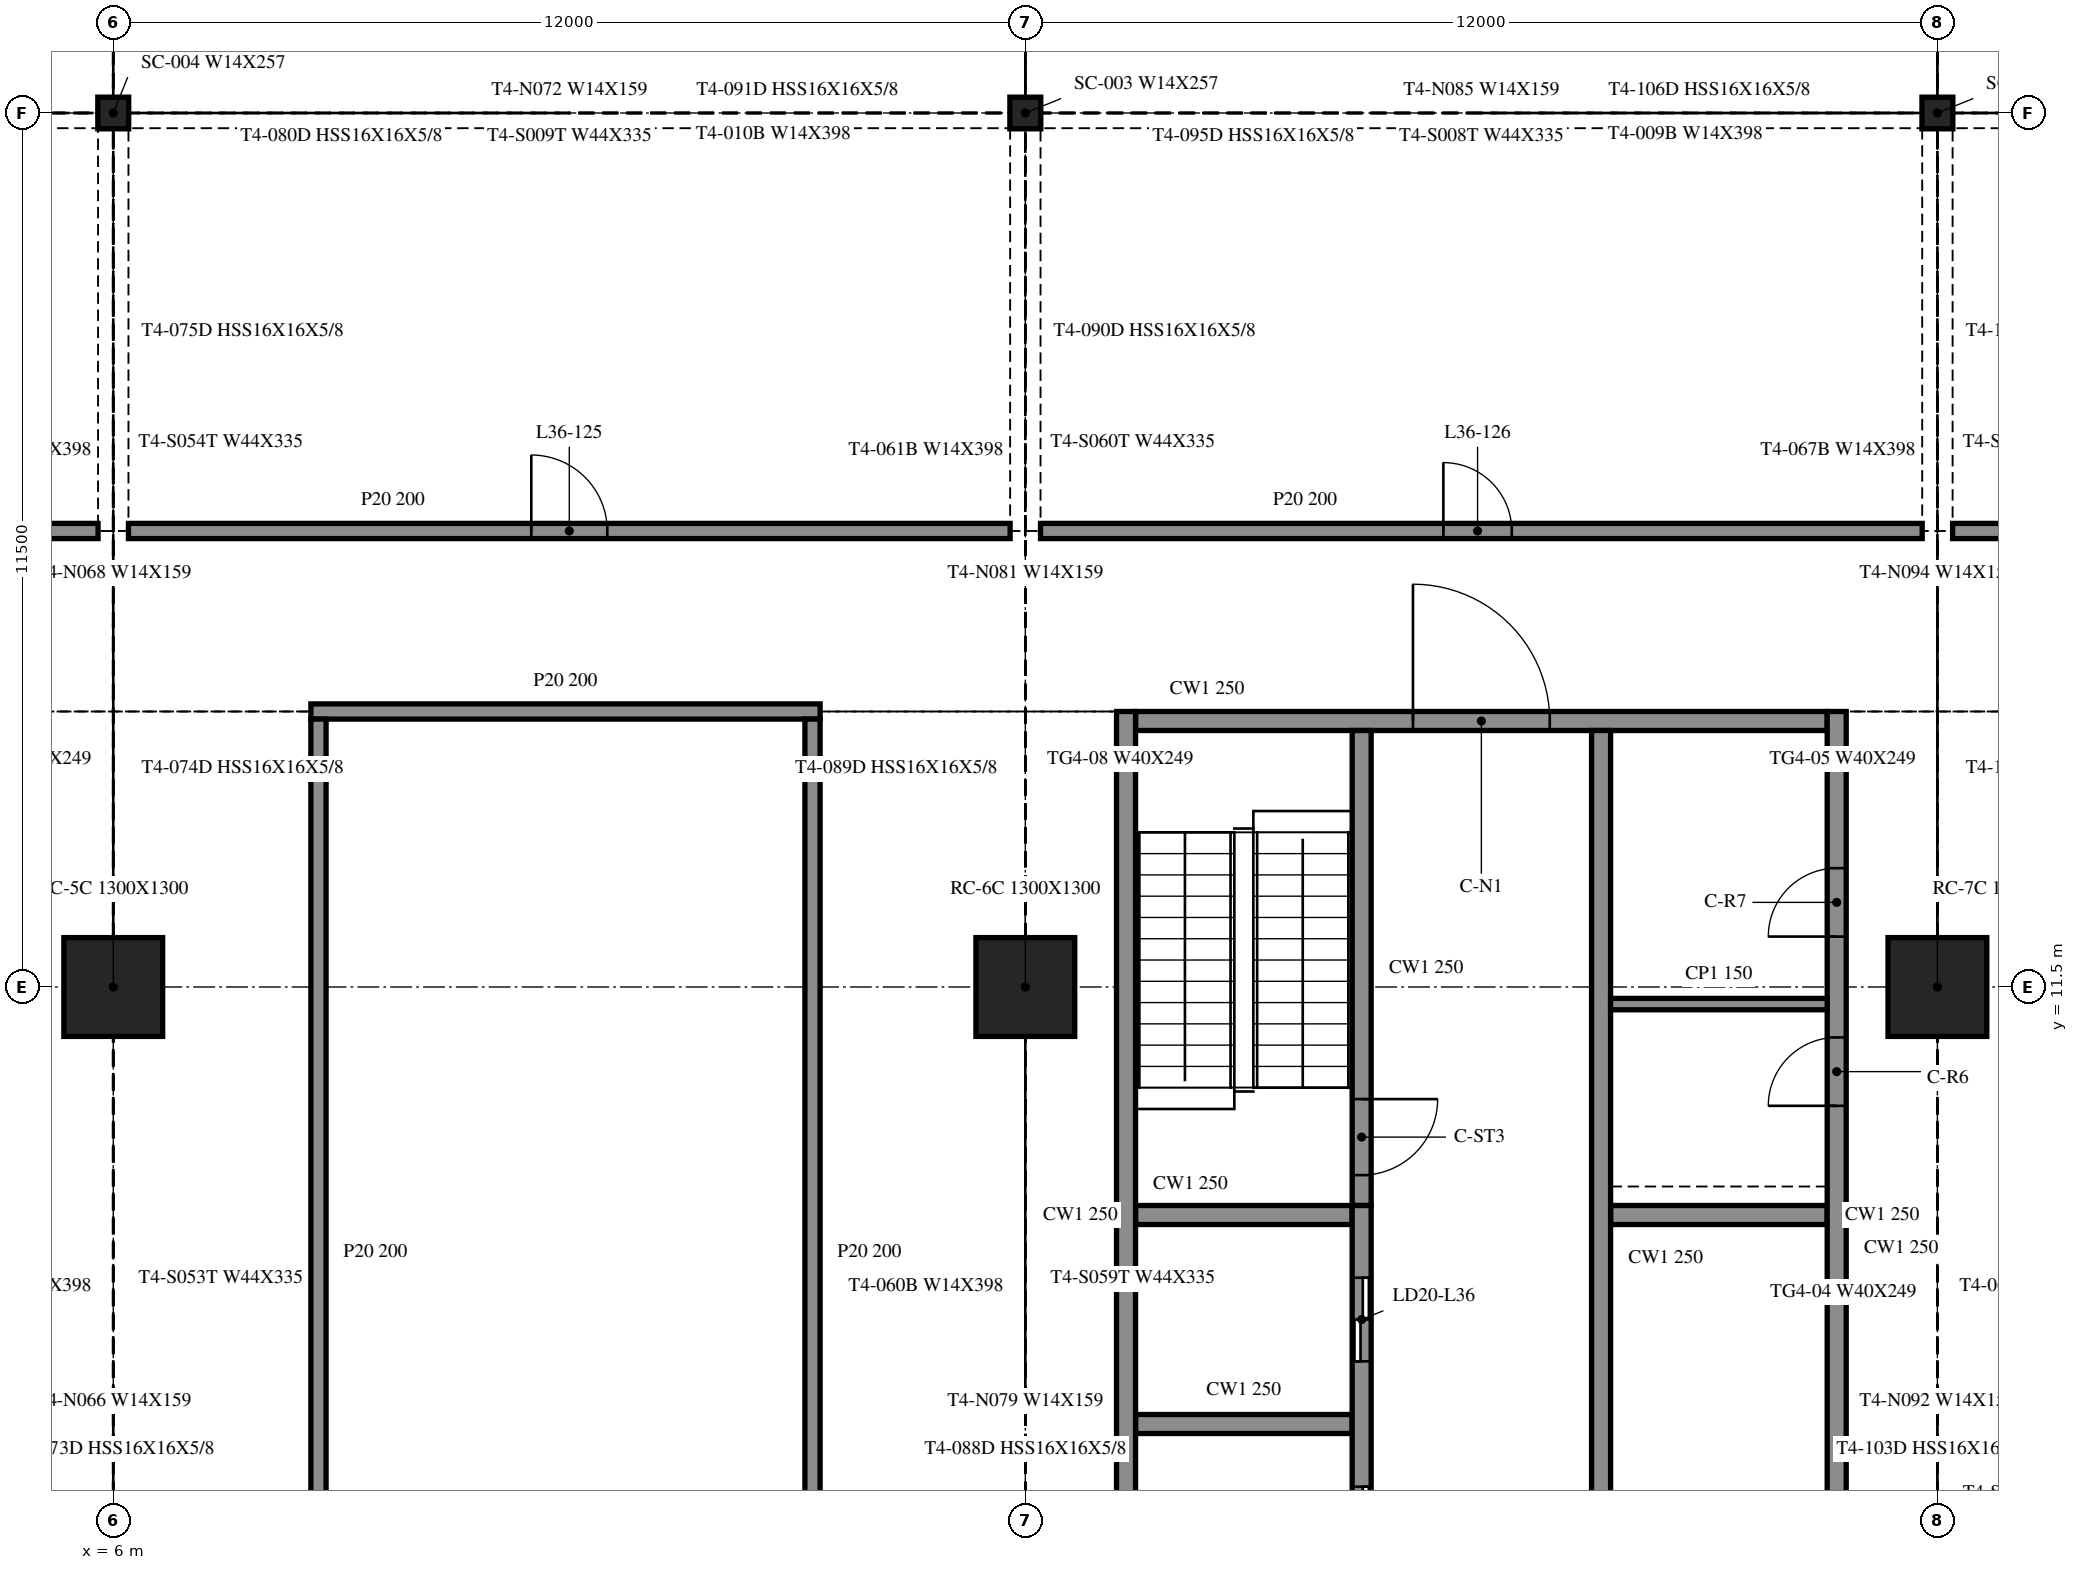
"""IFC4 building model, lengths in metres.
Left out: names, types, materials, properties, quantities, classifications, styles, units other than length and angle.
Written with IfcOpenShell. Run it as: python <this file> out.ifc"""

import sys

from ifc_helpers import new_model, si_unit, direction, frame, frame_2d, origin, origin_2d, place, context, subcontext, project, spatial, rectangle, i_section, extrude, element, fill, save


model = new_model("IFC4")
c1 = context("Model", 3, precision=1e-05, world=origin(), true_north=direction((0.0, 1.0)))
c2 = subcontext(c1, "Body", "Model", "MODEL_VIEW")
j1 = project(units=[si_unit("LENGTHUNIT", "METRE"), si_unit("PLANEANGLEUNIT", "RADIAN")], contexts=[c1])
p1 = place(None, origin())
s1 = spatial("IfcSite", under=j1, at=p1, CompositionType="ELEMENT")
p2 = place(p1, origin())
s2 = spatial("IfcBuilding", under=s1, at=p2, CompositionType="ELEMENT")
p3 = place(p2, frame((0.0, 0.0, 154.8)))
s3 = spatial("IfcBuildingStorey", under=s2, at=p3, CompositionType="ELEMENT", Elevation=154.8)
for number, where, z_axis, x_axis in (
    (1, (6.0, 11.5, -0.55), (0.0, 0.0, 1.0), (1.0, 0.0, 0.0)),
    (2, (18.0, 11.5, -0.55), (0.0, 0.0, 1.0), (1.0, 0.0, 0.0)),
    (3, (30.0, 11.5, -0.55), (0.0, 0.0, 1.0), (1.0, 0.0, 0.0)),
):
    element("IfcColumn", number, at=place(p3, frame(where, z_axis=z_axis, x_axis=x_axis)), inside=s3, PredefinedType="COLUMN", context=c2, shape_type="SweptSolid", body=[
        extrude(rectangle(XDim=1.3, YDim=1.3, at=origin_2d()), origin(), (0.0, 0.0, 1.0), 4.61),
    ])
for number, where, z_axis, x_axis in (
    (4, (30.0, 23.0, -0.55), (0.0, 0.0, 1.0), (1.0, 0.0, 0.0)),
    (5, (18.0, 23.0, -0.55), (0.0, 0.0, 1.0), (1.0, 0.0, 0.0)),
    (6, (6.0, 23.0, -0.55), (0.0, 0.0, 1.0), (1.0, 0.0, 0.0)),
):
    element("IfcColumn", number, at=place(p3, frame(where, z_axis=z_axis, x_axis=x_axis)), inside=s3, PredefinedType="COLUMN", context=c2, shape_type="SweptSolid", body=[
        extrude(i_section(OverallWidth=0.406, OverallDepth=0.417, WebThickness=0.03, FlangeThickness=0.048, at=origin_2d()), origin(), (0.0, 0.0, 1.0), 4.61),
    ])
p4 = place(p3, frame((19.325, 15.125, 0.0), z_axis=(0.0, 0.0, 1.0), x_axis=(0.0, -1.0, 0.0)))
e7 = element("IfcWall", 7, at=p4, inside=s3, PredefinedType="SOLIDWALL", context=c2, shape_type="SweptSolid", body=[
    extrude(rectangle(XDim=24.25, YDim=0.25, at=frame_2d((12.125, 0.0))), origin(), (0.0, 0.0, 1.0), 4.06),
])
p5 = place(p3, frame((28.675, -9.125, 0.0), z_axis=(0.0, 0.0, 1.0), x_axis=(0.0, 1.0, 0.0)))
e8 = element("IfcWall", 8, at=p5, inside=s3, PredefinedType="SOLIDWALL", context=c2, shape_type="SweptSolid", body=[
    extrude(rectangle(XDim=24.25, YDim=0.25, at=frame_2d((12.125, 0.0))), origin(), (0.0, 0.0, 1.0), 4.06),
])
p6 = place(p5, frame((19.062, 0.0, 0.0)))
e9 = element("IfcOpeningElement", 9, at=p6, cuts=e8, PredefinedType="OPENING", context=c2, shape_type="SweptSolid", body=[
    extrude(rectangle(XDim=0.9, YDim=2.1, at=frame_2d((0.45, 1.05))), frame((0.0, 0.135, 0.0), z_axis=(0.0, -1.0, 0.0), x_axis=(1.0, 0.0, 0.0)), (0.0, 0.0, 1.0), 0.27),
])
p7 = place(p5, frame((21.289, 0.0, 0.0)))
e10 = element("IfcOpeningElement", 10, at=p7, cuts=e8, PredefinedType="OPENING", context=c2, shape_type="SweptSolid", body=[
    extrude(rectangle(XDim=0.9, YDim=2.1, at=frame_2d((0.45, 1.05))), frame((0.0, 0.135, 0.0), z_axis=(0.0, -1.0, 0.0), x_axis=(1.0, 0.0, 0.0)), (0.0, 0.0, 1.0), 0.27),
])
p8 = place(p3, frame((19.45, 15.0, 0.0), z_axis=(0.0, 0.0, 1.0), x_axis=(1.0, 0.0, 0.0)))
e11 = element("IfcWall", 11, at=p8, inside=s3, PredefinedType="SOLIDWALL", context=c2, shape_type="SweptSolid", body=[
    extrude(rectangle(XDim=9.1, YDim=0.25, at=frame_2d((4.55, 0.0))), origin(), (0.0, 0.0, 1.0), 4.06),
])
p9 = place(p8, frame((3.65, 0.0, 0.0)))
e12 = element("IfcOpeningElement", 12, at=p9, cuts=e11, PredefinedType="OPENING", context=c2, shape_type="SweptSolid", body=[
    extrude(rectangle(XDim=1.8, YDim=2.1, at=frame_2d((0.9, 1.05))), frame((0.0, 0.135, 0.0), z_axis=(0.0, -1.0, 0.0), x_axis=(1.0, 0.0, 0.0)), (0.0, 0.0, 1.0), 0.27),
])
p10 = place(p3, frame((22.425, -8.875, 0.0), z_axis=(0.0, 0.0, 1.0), x_axis=(0.0, 1.0, 0.0)))
e13 = element("IfcWall", 13, at=p10, inside=s3, PredefinedType="SOLIDWALL", context=c2, shape_type="SweptSolid", body=[
    extrude(rectangle(XDim=17.5, YDim=0.25, at=frame_2d((8.75, 0.0))), origin(), (0.0, 0.0, 1.0), 4.06),
])
p11 = place(p10, frame((7.2, 0.0, 0.0)))
e14 = element("IfcOpeningElement", 14, at=p11, cuts=e13, PredefinedType="OPENING", context=c2, shape_type="SweptSolid", body=[
    extrude(rectangle(XDim=1.1, YDim=2.1, at=frame_2d((0.55, 1.05))), frame((0.0, 0.135, 0.0), z_axis=(0.0, -1.0, 0.0), x_axis=(1.0, 0.0, 0.0)), (0.0, 0.0, 1.0), 0.27),
])
p12 = place(p10, frame((9.95, 0.0, 0.0)))
e15 = element("IfcOpeningElement", 15, at=p12, cuts=e13, PredefinedType="OPENING", context=c2, shape_type="SweptSolid", body=[
    extrude(rectangle(XDim=1.1, YDim=2.1, at=frame_2d((0.55, 1.05))), frame((0.0, 0.135, 0.0), z_axis=(0.0, -1.0, 0.0), x_axis=(1.0, 0.0, 0.0)), (0.0, 0.0, 1.0), 0.27),
])
p13 = place(p10, frame((12.7, 0.0, 0.0)))
e16 = element("IfcOpeningElement", 16, at=p13, cuts=e13, PredefinedType="OPENING", context=c2, shape_type="SweptSolid", body=[
    extrude(rectangle(XDim=1.1, YDim=2.1, at=frame_2d((0.55, 1.05))), frame((0.0, 0.135, 0.0), z_axis=(0.0, -1.0, 0.0), x_axis=(1.0, 0.0, 0.0)), (0.0, 0.0, 1.0), 0.27),
])
p14 = place(p10, frame((15.45, 0.0, 0.0)))
e17 = element("IfcOpeningElement", 17, at=p14, cuts=e13, PredefinedType="OPENING", context=c2, shape_type="SweptSolid", body=[
    extrude(rectangle(XDim=1.1, YDim=2.1, at=frame_2d((0.55, 1.05))), frame((0.0, 0.135, 0.0), z_axis=(0.0, -1.0, 0.0), x_axis=(1.0, 0.0, 0.0)), (0.0, 0.0, 1.0), 0.27),
])
p15 = place(p10, frame((0.512, 0.0, 0.0)))
e18 = element("IfcOpeningElement", 18, at=p15, cuts=e13, PredefinedType="OPENING", context=c2, shape_type="SweptSolid", body=[
    extrude(rectangle(XDim=0.9, YDim=2.1, at=frame_2d((0.45, 1.05))), frame((0.0, 0.135, 0.0), z_axis=(0.0, -1.0, 0.0), x_axis=(1.0, 0.0, 0.0)), (0.0, 0.0, 1.0), 0.27),
])
p16 = place(p10, frame((2.55, 0.0, 0.0)))
e19 = element("IfcOpeningElement", 19, at=p16, cuts=e13, PredefinedType="OPENING", context=c2, shape_type="SweptSolid", body=[
    extrude(rectangle(XDim=0.9, YDim=2.1, at=frame_2d((0.45, 1.05))), frame((0.0, 0.135, 0.0), z_axis=(0.0, -1.0, 0.0), x_axis=(1.0, 0.0, 0.0)), (0.0, 0.0, 1.0), 0.27),
])
p17 = place(p10, frame((4.587, 0.0, 0.0)))
e20 = element("IfcOpeningElement", 20, at=p17, cuts=e13, PredefinedType="OPENING", context=c2, shape_type="SweptSolid", body=[
    extrude(rectangle(XDim=0.9, YDim=2.1, at=frame_2d((0.45, 1.05))), frame((0.0, 0.135, 0.0), z_axis=(0.0, -1.0, 0.0), x_axis=(1.0, 0.0, 0.0)), (0.0, 0.0, 1.0), 0.27),
])
p18 = place(p3, frame((22.425, 14.875, 0.0), z_axis=(0.0, 0.0, 1.0), x_axis=(0.0, -1.0, 0.0)))
e21 = element("IfcWall", 21, at=p18, inside=s3, PredefinedType="SOLIDWALL", context=c2, shape_type="SweptSolid", body=[
    extrude(rectangle(XDim=6.25, YDim=0.25, at=frame_2d((3.125, 0.0))), origin(), (0.0, 0.0, 1.0), 4.06),
])
p19 = place(p18, frame((4.85, 0.0, 0.0)))
e22 = element("IfcOpeningElement", 22, at=p19, cuts=e21, PredefinedType="OPENING", context=c2, shape_type="SweptSolid", body=[
    extrude(rectangle(XDim=1.0, YDim=2.1, at=frame_2d((0.5, 1.05))), frame((0.0, 0.135, 0.0), z_axis=(0.0, -1.0, 0.0), x_axis=(1.0, 0.0, 0.0)), (0.0, 0.0, 1.0), 0.27),
])
p20 = place(p3, frame((25.575, 14.875, 0.0), z_axis=(0.0, 0.0, 1.0), x_axis=(0.0, -1.0, 0.0)))
e23 = element("IfcWall", 23, at=p20, inside=s3, PredefinedType="SOLIDWALL", context=c2, shape_type="SweptSolid", body=[
    extrude(rectangle(XDim=17.5, YDim=0.25, at=frame_2d((8.75, 0.0))), origin(), (0.0, 0.0, 1.0), 4.06),
])
p21 = place(p20, frame((15.45, 0.0, 0.0)))
e24 = element("IfcOpeningElement", 24, at=p21, cuts=e23, PredefinedType="OPENING", context=c2, shape_type="SweptSolid", body=[
    extrude(rectangle(XDim=1.1, YDim=2.1, at=frame_2d((0.55, 1.05))), frame((0.0, 0.135, 0.0), z_axis=(0.0, -1.0, 0.0), x_axis=(1.0, 0.0, 0.0)), (0.0, 0.0, 1.0), 0.27),
])
p22 = place(p20, frame((12.8, 0.0, 0.0)))
e25 = element("IfcOpeningElement", 25, at=p22, cuts=e23, PredefinedType="OPENING", context=c2, shape_type="SweptSolid", body=[
    extrude(rectangle(XDim=0.9, YDim=2.1, at=frame_2d((0.45, 1.05))), frame((0.0, 0.135, 0.0), z_axis=(0.0, -1.0, 0.0), x_axis=(1.0, 0.0, 0.0)), (0.0, 0.0, 1.0), 0.27),
])
for number, where, z_axis, x_axis in (
    (26, (19.45, 5.75, 0.0), (0.0, 0.0, 1.0), (1.0, 0.0, 0.0)),
    (27, (19.45, 8.5, 0.0), (0.0, 0.0, 1.0), (1.0, 0.0, 0.0)),
    (28, (25.7, 8.5, 0.0), (0.0, 0.0, 1.0), (1.0, 0.0, 0.0)),
):
    element("IfcWall", number, at=place(p3, frame(where, z_axis=z_axis, x_axis=x_axis)), inside=s3, PredefinedType="SOLIDWALL", context=c2, shape_type="SweptSolid", body=[
        extrude(rectangle(XDim=2.85, YDim=0.25, at=frame_2d((1.425, 0.0))), origin(), (0.0, 0.0, 1.0), 4.06),
    ])
p23 = place(p3, frame((25.7, 11.275, 0.0), z_axis=(0.0, 0.0, 1.0), x_axis=(1.0, 0.0, 0.0)))
e29 = element("IfcWall", 29, at=p23, inside=s3, PredefinedType="PARTITIONING", context=c2, shape_type="SweptSolid", body=[
    extrude(rectangle(XDim=2.85, YDim=0.15, at=frame_2d((1.425, 0.0))), origin(), (0.0, 0.0, 1.0), 4.06),
])
p24 = place(p3, frame((8.6, 15.125, 0.0), z_axis=(0.0, 0.0, 1.0), x_axis=(1.0, 0.0, 0.0)))
e30 = element("IfcWall", 30, at=p24, inside=s3, PredefinedType="PARTITIONING", context=c2, shape_type="SweptSolid", body=[
    extrude(rectangle(XDim=6.7, YDim=0.2, at=frame_2d((3.35, 0.0))), origin(), (0.0, 0.0, 1.0), 4.06),
])
p25 = place(p3, frame((-5.8, 17.5, 0.0), z_axis=(0.0, 0.0, 1.0), x_axis=(1.0, 0.0, 0.0)))
e31 = element("IfcWall", 31, at=p25, inside=s3, PredefinedType="PARTITIONING", context=c2, shape_type="SweptSolid", body=[
    extrude(rectangle(XDim=11.6, YDim=0.2, at=frame_2d((5.8, 0.0))), origin(), (0.0, 0.0, 1.0), 4.06),
])
p26 = place(p25, frame((5.3, 0.0, 0.0)))
e32 = element("IfcOpeningElement", 32, at=p26, cuts=e31, PredefinedType="OPENING", context=c2, shape_type="SweptSolid", body=[
    extrude(rectangle(XDim=1.0, YDim=2.1, at=frame_2d((0.5, 1.05))), frame((0.0, 0.11, 0.0), z_axis=(0.0, -1.0, 0.0), x_axis=(1.0, 0.0, 0.0)), (0.0, 0.0, 1.0), 0.22),
])
p27 = place(p3, frame((6.2, 17.5, 0.0), z_axis=(0.0, 0.0, 1.0), x_axis=(1.0, 0.0, 0.0)))
e33 = element("IfcWall", 33, at=p27, inside=s3, PredefinedType="PARTITIONING", context=c2, shape_type="SweptSolid", body=[
    extrude(rectangle(XDim=11.6, YDim=0.2, at=frame_2d((5.8, 0.0))), origin(), (0.0, 0.0, 1.0), 4.06),
])
p28 = place(p27, frame((5.3, 0.0, 0.0)))
e34 = element("IfcOpeningElement", 34, at=p28, cuts=e33, PredefinedType="OPENING", context=c2, shape_type="SweptSolid", body=[
    extrude(rectangle(XDim=1.0, YDim=2.1, at=frame_2d((0.5, 1.05))), frame((0.0, 0.11, 0.0), z_axis=(0.0, -1.0, 0.0), x_axis=(1.0, 0.0, 0.0)), (0.0, 0.0, 1.0), 0.22),
])
p29 = place(p3, frame((18.2, 17.5, 0.0), z_axis=(0.0, 0.0, 1.0), x_axis=(1.0, 0.0, 0.0)))
e35 = element("IfcWall", 35, at=p29, inside=s3, PredefinedType="PARTITIONING", context=c2, shape_type="SweptSolid", body=[
    extrude(rectangle(XDim=11.6, YDim=0.2, at=frame_2d((5.8, 0.0))), origin(), (0.0, 0.0, 1.0), 4.06),
])
p30 = place(p29, frame((5.3, 0.0, 0.0)))
e36 = element("IfcOpeningElement", 36, at=p30, cuts=e35, PredefinedType="OPENING", context=c2, shape_type="SweptSolid", body=[
    extrude(rectangle(XDim=0.9, YDim=2.1, at=frame_2d((0.45, 1.05))), frame((0.0, 0.11, 0.0), z_axis=(0.0, -1.0, 0.0), x_axis=(1.0, 0.0, 0.0)), (0.0, 0.0, 1.0), 0.22),
])
p31 = place(p3, frame((30.2, 17.5, 0.0), z_axis=(0.0, 0.0, 1.0), x_axis=(1.0, 0.0, 0.0)))
e37 = element("IfcWall", 37, at=p31, inside=s3, PredefinedType="PARTITIONING", context=c2, shape_type="SweptSolid", body=[
    extrude(rectangle(XDim=11.6, YDim=0.2, at=frame_2d((5.8, 0.0))), origin(), (0.0, 0.0, 1.0), 4.06),
])
p32 = place(p31, frame((5.1, 0.0, 0.0)))
e38 = element("IfcOpeningElement", 38, at=p32, cuts=e37, PredefinedType="OPENING", context=c2, shape_type="SweptSolid", body=[
    extrude(rectangle(XDim=1.2, YDim=2.1, at=frame_2d((0.6, 1.05))), frame((0.0, 0.11, 0.0), z_axis=(0.0, -1.0, 0.0), x_axis=(1.0, 0.0, 0.0)), (0.0, 0.0, 1.0), 0.22),
])
for number, where, z_axis, x_axis in (
    (39, (8.7, -9.025, 0.0), (0.0, 0.0, 1.0), (0.0, 1.0, 0.0)),
    (40, (15.2, -9.025, 0.0), (0.0, 0.0, 1.0), (0.0, 1.0, 0.0)),
):
    element("IfcWall", number, at=place(p3, frame(where, z_axis=z_axis, x_axis=x_axis)), inside=s3, PredefinedType="PARTITIONING", context=c2, shape_type="SweptSolid", body=[
        extrude(rectangle(XDim=24.05, YDim=0.2, at=frame_2d((12.025, 0.0))), origin(), (0.0, 0.0, 1.0), 4.06),
    ])
p33 = place(p9, origin())
e41 = element("IfcDoor", 41, at=p33, inside=s3, OperationType="DOUBLE_DOOR_SINGLE_SWING", PredefinedType="DOOR", context=c2, shape_type="SweptSolid", body=[
    extrude(rectangle(XDim=1.8, YDim=2.1, at=frame_2d((0.9, 1.05))), frame((0.0, 0.025, 0.0), z_axis=(0.0, -1.0, 0.0), x_axis=(1.0, 0.0, 0.0)), (0.0, 0.0, 1.0), 0.05),
])
fill(e12, e41)
p34 = place(p13, origin())
e42 = element("IfcDoor", 42, at=p34, inside=s3, OperationType="DOUBLE_DOOR_SLIDING", PredefinedType="DOOR", context=c2, shape_type="SweptSolid", body=[
    extrude(rectangle(XDim=1.1, YDim=2.1, at=frame_2d((0.55, 1.05))), frame((0.0, 0.025, 0.0), z_axis=(0.0, -1.0, 0.0), x_axis=(1.0, 0.0, 0.0)), (0.0, 0.0, 1.0), 0.05),
])
fill(e16, e42)
p35 = place(p14, origin())
e43 = element("IfcDoor", 43, at=p35, inside=s3, OperationType="DOUBLE_DOOR_SLIDING", PredefinedType="DOOR", context=c2, shape_type="SweptSolid", body=[
    extrude(rectangle(XDim=1.1, YDim=2.1, at=frame_2d((0.55, 1.05))), frame((0.0, 0.025, 0.0), z_axis=(0.0, -1.0, 0.0), x_axis=(1.0, 0.0, 0.0)), (0.0, 0.0, 1.0), 0.05),
])
fill(e17, e43)
p36 = place(p6, origin())
e44 = element("IfcDoor", 44, at=p36, inside=s3, OperationType="SINGLE_SWING_LEFT", PredefinedType="DOOR", context=c2, shape_type="SweptSolid", body=[
    extrude(rectangle(XDim=0.9, YDim=2.1, at=frame_2d((0.45, 1.05))), frame((0.0, 0.025, 0.0), z_axis=(0.0, -1.0, 0.0), x_axis=(1.0, 0.0, 0.0)), (0.0, 0.0, 1.0), 0.05),
])
fill(e9, e44)
p37 = place(p7, origin())
e45 = element("IfcDoor", 45, at=p37, inside=s3, OperationType="SINGLE_SWING_RIGHT", PredefinedType="DOOR", context=c2, shape_type="SweptSolid", body=[
    extrude(rectangle(XDim=0.9, YDim=2.1, at=frame_2d((0.45, 1.05))), frame((0.0, 0.025, 0.0), z_axis=(0.0, -1.0, 0.0), x_axis=(1.0, 0.0, 0.0)), (0.0, 0.0, 1.0), 0.05),
])
fill(e10, e45)
p38 = place(p19, origin())
e46 = element("IfcDoor", 46, at=p38, inside=s3, OperationType="SINGLE_SWING_LEFT", PredefinedType="DOOR", context=c2, shape_type="SweptSolid", body=[
    extrude(rectangle(XDim=1.0, YDim=2.1, at=frame_2d((0.5, 1.05))), frame((0.0, 0.025, 0.0), z_axis=(0.0, -1.0, 0.0), x_axis=(1.0, 0.0, 0.0)), (0.0, 0.0, 1.0), 0.05),
])
fill(e22, e46)
p39 = place(p28, origin())
e47 = element("IfcDoor", 47, at=p39, inside=s3, OperationType="SINGLE_SWING_LEFT", PredefinedType="DOOR", context=c2, shape_type="SweptSolid", body=[
    extrude(rectangle(XDim=1.0, YDim=2.1, at=frame_2d((0.5, 1.05))), frame((0.0, 0.025, 0.0), z_axis=(0.0, -1.0, 0.0), x_axis=(1.0, 0.0, 0.0)), (0.0, 0.0, 1.0), 0.05),
])
fill(e34, e47)
p40 = place(p30, origin())
e48 = element("IfcDoor", 48, at=p40, inside=s3, OperationType="SINGLE_SWING_LEFT", PredefinedType="DOOR", context=c2, shape_type="SweptSolid", body=[
    extrude(rectangle(XDim=0.9, YDim=2.1, at=frame_2d((0.45, 1.05))), frame((0.0, 0.025, 0.0), z_axis=(0.0, -1.0, 0.0), x_axis=(1.0, 0.0, 0.0)), (0.0, 0.0, 1.0), 0.05),
])
fill(e36, e48)
save(model, sys.argv[1])
